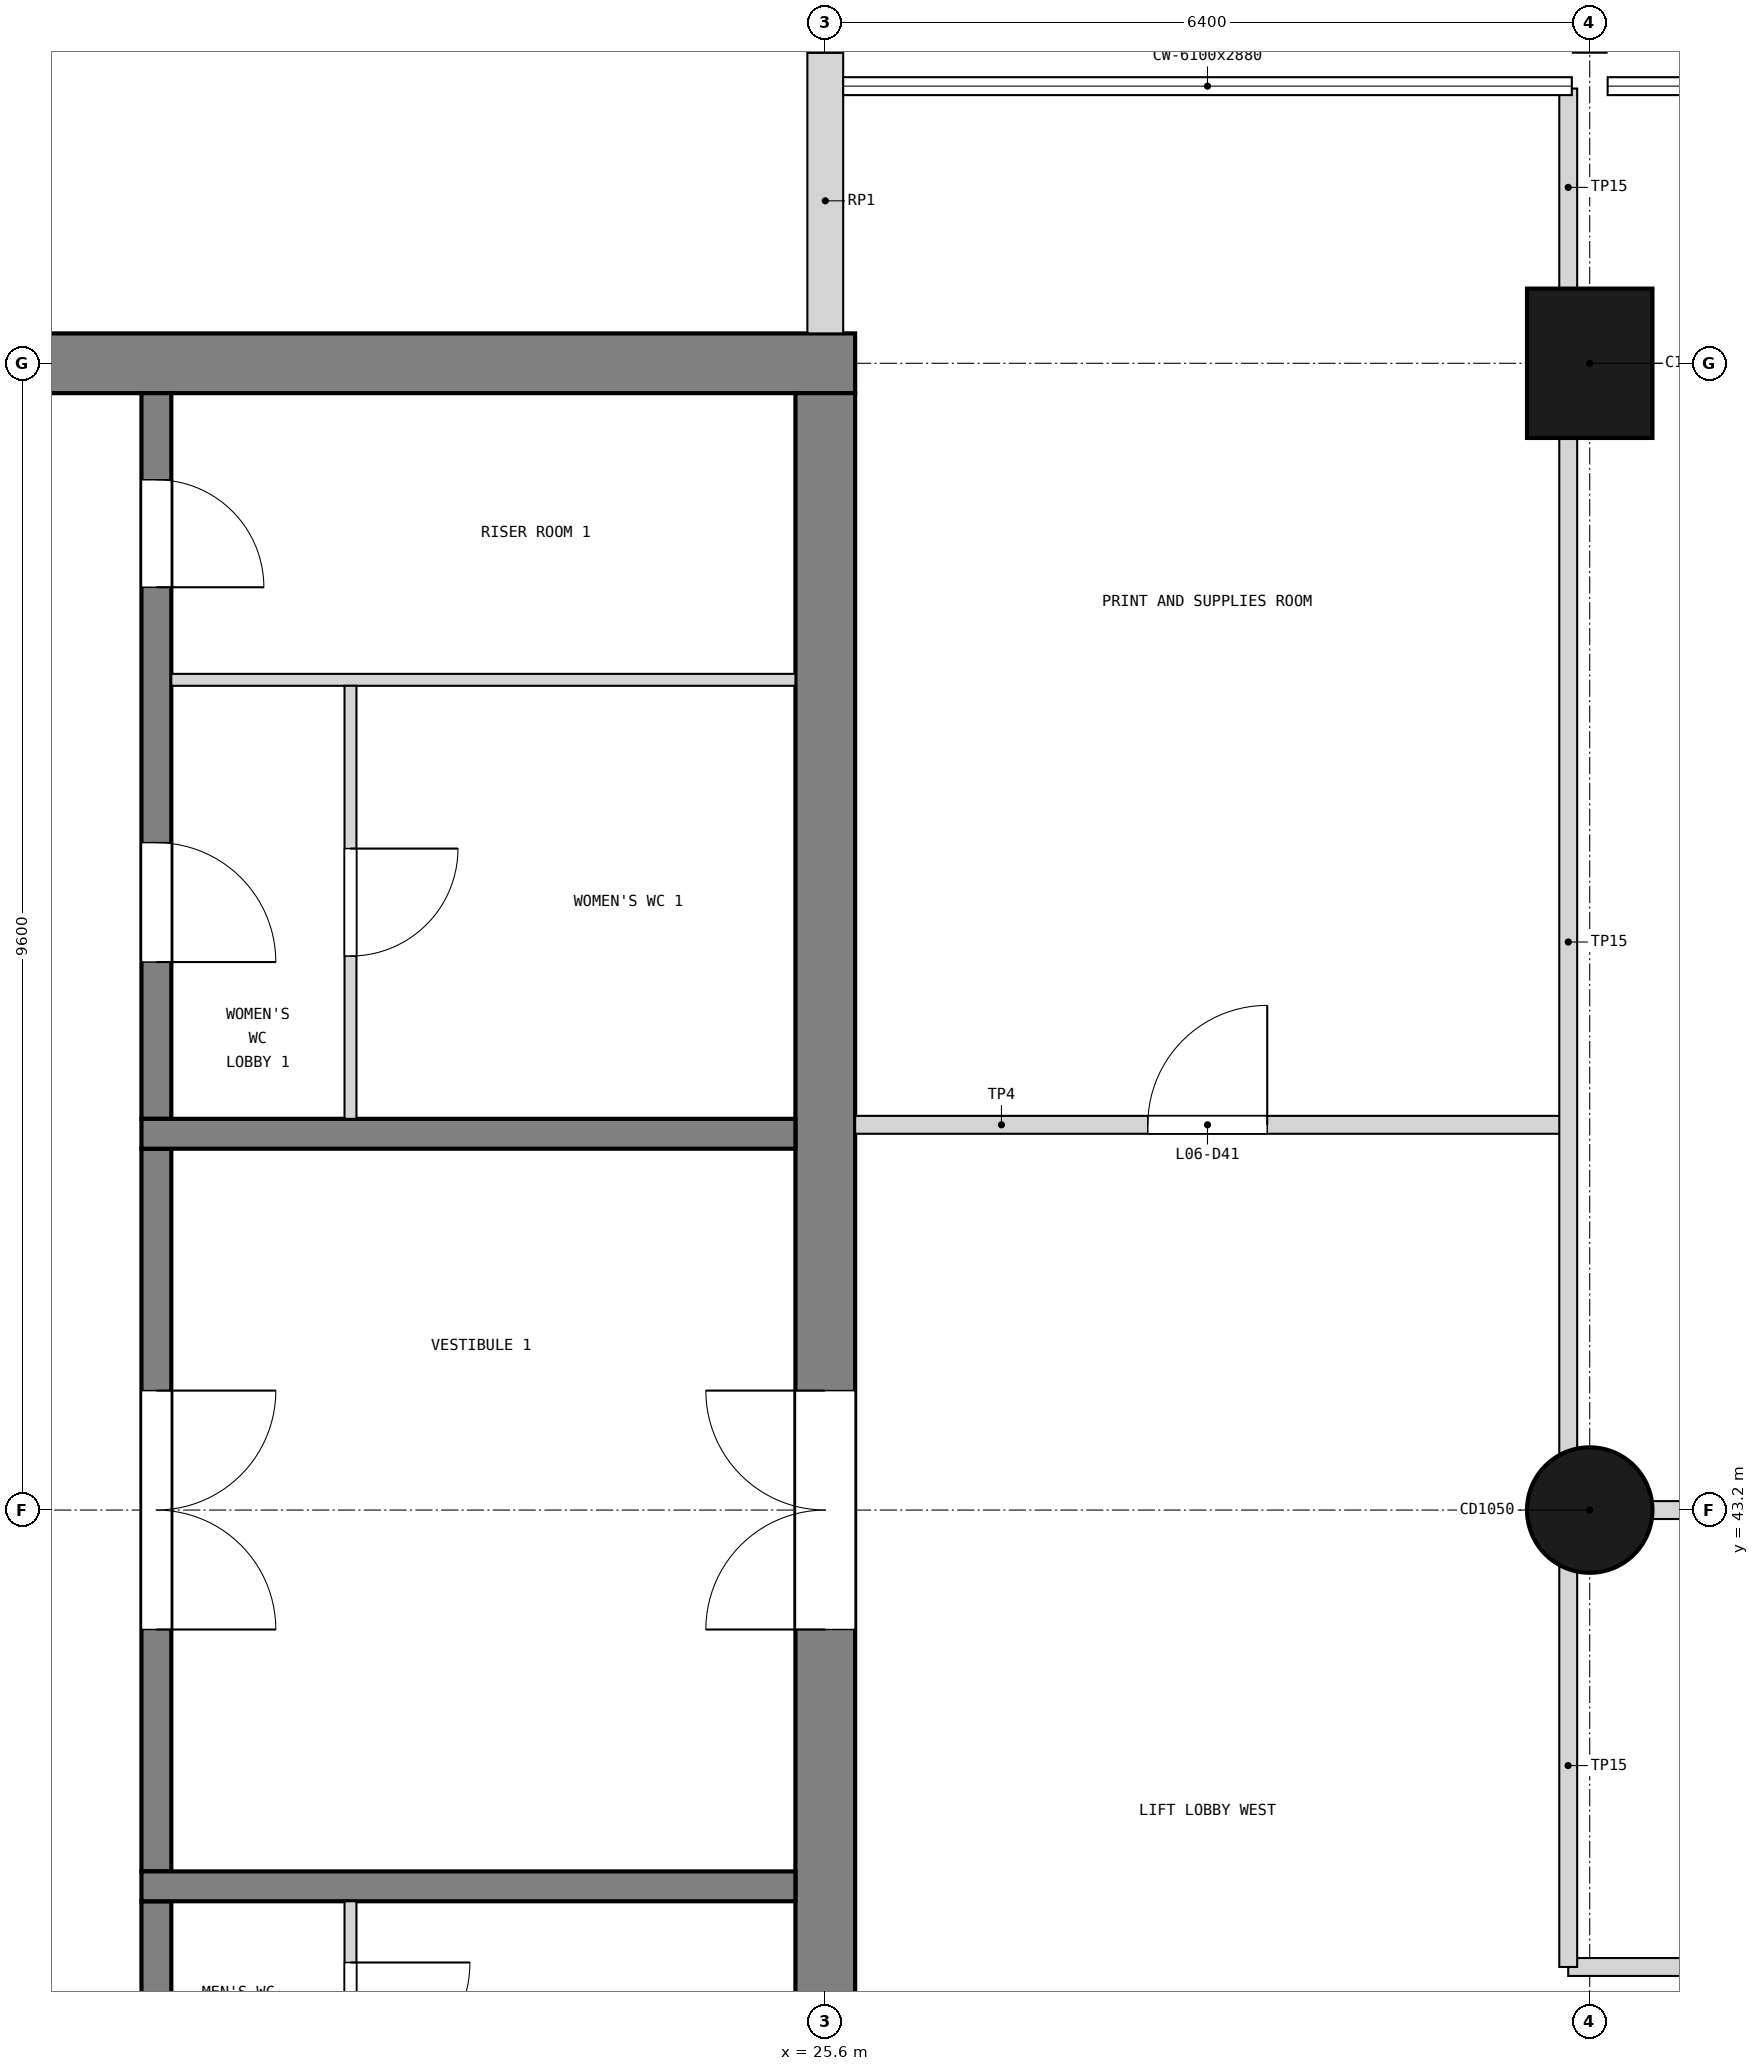
"""IFC4 building model, lengths in metres.
Left out: names, types, materials, properties, quantities, classifications, styles, units other than length and angle.
Written with IfcOpenShell. Run it as: python <this file> out.ifc"""

import sys

from ifc_helpers import new_model, si_unit, direction, frame, frame_2d, origin, origin_2d, place, context, subcontext, project, spatial, rectangle, circle, extrude, element, fill, save


model = new_model("IFC4")
c1 = context("Model", 3, precision=1e-05, world=origin(), true_north=direction((0.0, 1.0)))
c2 = subcontext(c1, "Body", "Model", "MODEL_VIEW")
j1 = project(units=[si_unit("LENGTHUNIT", "METRE"), si_unit("PLANEANGLEUNIT", "RADIAN")], contexts=[c1])
p1 = place(None, origin())
s1 = spatial("IfcSite", under=j1, at=p1, CompositionType="ELEMENT")
p2 = place(p1, origin())
s2 = spatial("IfcBuilding", under=s1, at=p2, CompositionType="ELEMENT")
p3 = place(p2, frame((0.0, 0.0, 24.9)))
s3 = spatial("IfcBuildingStorey", under=s2, at=p3, CompositionType="ELEMENT", Elevation=24.9)
p4 = place(p3, frame((12.55, 52.8, 0.0), z_axis=(0.0, 0.0, 1.0), x_axis=(1.0, 0.0, 0.0)))
e1 = element("IfcWall", 1, at=p4, inside=s3, PredefinedType="SHEAR", context=c2, shape_type="SweptSolid", body=[
    extrude(rectangle(XDim=13.3, YDim=0.5, at=frame_2d((6.65, 0.0))), origin(), (0.0, 0.0, 1.0), 3.9),
])
p5 = place(p4, frame((1.85, 0.0, 1.0)))
e2 = element("IfcOpeningElement", 2, at=p5, cuts=e1, PredefinedType="OPENING", context=c2, shape_type="SweptSolid", body=[
    extrude(rectangle(XDim=0.4, YDim=2.0, at=frame_2d((0.2, 1.0))), frame((0.0, 0.26, 0.0), z_axis=(0.0, -1.0, 0.0), x_axis=(1.0, 0.0, 0.0)), (0.0, 0.0, 1.0), 0.52),
])
p6 = place(p3, frame((25.6, 33.85, 0.0), z_axis=(0.0, 0.0, 1.0), x_axis=(0.0, 1.0, 0.0)))
e3 = element("IfcWall", 3, at=p6, inside=s3, PredefinedType="SHEAR", context=c2, shape_type="SweptSolid", body=[
    extrude(rectangle(XDim=18.7, YDim=0.5, at=frame_2d((9.35, 0.0))), origin(), (0.0, 0.0, 1.0), 3.9),
])
p7 = place(p6, frame((8.35, 0.0, 0.0)))
e4 = element("IfcOpeningElement", 4, at=p7, cuts=e3, PredefinedType="OPENING", context=c2, shape_type="SweptSolid", body=[
    extrude(rectangle(XDim=2.0, YDim=2.1, at=frame_2d((1.0, 1.05))), frame((0.0, 0.26, 0.0), z_axis=(0.0, -1.0, 0.0), x_axis=(1.0, 0.0, 0.0)), (0.0, 0.0, 1.0), 0.52),
])
p8 = place(p3, frame((32.0, 43.2, 0.0), z_axis=(0.0, 0.0, 1.0), x_axis=(1.0, 0.0, 0.0)))
e5 = element("IfcColumn", 5, at=p8, inside=s3, PredefinedType="COLUMN", context=c2, shape_type="SweptSolid", body=[
    extrude(circle(Radius=0.525, at=origin_2d()), origin(), (0.0, 0.0, 1.0), 3.9),
])
p9 = place(p3, frame((32.0, 52.8, 0.0), z_axis=(0.0, 0.0, 1.0), x_axis=(1.0, 0.0, 0.0)))
e6 = element("IfcColumn", 6, at=p9, inside=s3, PredefinedType="COLUMN", context=c2, shape_type="SweptSolid", body=[
    extrude(rectangle(XDim=1.05, YDim=1.25, at=origin_2d()), origin(), (0.0, 0.0, 1.0), 3.9),
])
p10 = place(p3, frame((25.6, 53.05, 0.0), z_axis=(0.0, 0.0, 1.0), x_axis=(0.0, 1.0, 0.0)))
e7 = element("IfcWall", 7, at=p10, inside=s3, PredefinedType="SOLIDWALL", context=c2, shape_type="SweptSolid", body=[
    extrude(rectangle(XDim=2.35, YDim=0.3, at=frame_2d((1.175, 0.0))), origin(), (0.0, 0.0, 1.0), 2.88),
])
p11 = place(p3, frame((20.0, 33.85, 0.0), z_axis=(0.0, 0.0, 1.0), x_axis=(0.0, 1.0, 0.0)))
e8 = element("IfcWall", 8, at=p11, inside=s3, PredefinedType="SOLIDWALL", context=c2, shape_type="SweptSolid", body=[
    extrude(rectangle(XDim=6.075, YDim=0.25, at=frame_2d((3.038, 0.0))), origin(), (0.0, 0.0, 1.0), 3.6),
])
p12 = place(p11, frame((0.425, 0.0, 0.0)))
e9 = element("IfcOpeningElement", 9, at=p12, cuts=e8, PredefinedType="OPENING", context=c2, shape_type="SweptSolid", body=[
    extrude(rectangle(XDim=0.8, YDim=2.1, at=frame_2d((0.4, 1.05))), frame((0.0, 0.135, 0.0), z_axis=(0.0, -1.0, 0.0), x_axis=(1.0, 0.0, 0.0)), (0.0, 0.0, 1.0), 0.27),
])
p13 = place(p11, frame((3.413, 0.0, 0.0)))
e10 = element("IfcOpeningElement", 10, at=p13, cuts=e8, PredefinedType="OPENING", context=c2, shape_type="SweptSolid", body=[
    extrude(rectangle(XDim=1.0, YDim=2.1, at=frame_2d((0.5, 1.05))), frame((0.0, 0.135, 0.0), z_axis=(0.0, -1.0, 0.0), x_axis=(1.0, 0.0, 0.0)), (0.0, 0.0, 1.0), 0.27),
])
p14 = place(p3, frame((20.0, 40.175, 0.0), z_axis=(0.0, 0.0, 1.0), x_axis=(0.0, 1.0, 0.0)))
e11 = element("IfcWall", 11, at=p14, inside=s3, PredefinedType="SOLIDWALL", context=c2, shape_type="SweptSolid", body=[
    extrude(rectangle(XDim=6.05, YDim=0.25, at=frame_2d((3.025, 0.0))), origin(), (0.0, 0.0, 1.0), 3.6),
])
p15 = place(p14, frame((2.025, 0.0, 0.0)))
e12 = element("IfcOpeningElement", 12, at=p15, cuts=e11, PredefinedType="OPENING", context=c2, shape_type="SweptSolid", body=[
    extrude(rectangle(XDim=2.0, YDim=2.1, at=frame_2d((1.0, 1.05))), frame((0.0, 0.135, 0.0), z_axis=(0.0, -1.0, 0.0), x_axis=(1.0, 0.0, 0.0)), (0.0, 0.0, 1.0), 0.27),
])
p16 = place(p3, frame((20.0, 46.475, 0.0), z_axis=(0.0, 0.0, 1.0), x_axis=(0.0, 1.0, 0.0)))
e13 = element("IfcWall", 13, at=p16, inside=s3, PredefinedType="SOLIDWALL", context=c2, shape_type="SweptSolid", body=[
    extrude(rectangle(XDim=6.075, YDim=0.25, at=frame_2d((3.038, 0.0))), origin(), (0.0, 0.0, 1.0), 3.6),
])
p17 = place(p16, frame((1.312, 0.0, 0.0)))
e14 = element("IfcOpeningElement", 14, at=p17, cuts=e13, PredefinedType="OPENING", context=c2, shape_type="SweptSolid", body=[
    extrude(rectangle(XDim=1.0, YDim=2.1, at=frame_2d((0.5, 1.05))), frame((0.0, 0.135, 0.0), z_axis=(0.0, -1.0, 0.0), x_axis=(1.0, 0.0, 0.0)), (0.0, 0.0, 1.0), 0.27),
])
p18 = place(p16, frame((4.45, 0.0, 0.0)))
e15 = element("IfcOpeningElement", 15, at=p18, cuts=e13, PredefinedType="OPENING", context=c2, shape_type="SweptSolid", body=[
    extrude(rectangle(XDim=0.9, YDim=2.1, at=frame_2d((0.45, 1.05))), frame((0.0, 0.135, 0.0), z_axis=(0.0, -1.0, 0.0), x_axis=(1.0, 0.0, 0.0)), (0.0, 0.0, 1.0), 0.27),
])
for number, where, z_axis, x_axis in (
    (16, (19.875, 40.05, 0.0), (0.0, 0.0, 1.0), (1.0, 0.0, 0.0)),
    (17, (19.875, 46.35, 0.0), (0.0, 0.0, 1.0), (1.0, 0.0, 0.0)),
):
    element("IfcWall", number, at=place(p3, frame(where, z_axis=z_axis, x_axis=x_axis)), inside=s3, PredefinedType="SOLIDWALL", context=c2, shape_type="SweptSolid", body=[
        extrude(rectangle(XDim=5.475, YDim=0.25, at=frame_2d((2.738, 0.0))), origin(), (0.0, 0.0, 1.0), 3.6),
    ])
p19 = place(p3, frame((21.625, 35.6, 0.0), z_axis=(0.0, 0.0, 1.0), x_axis=(0.0, 1.0, 0.0)))
e18 = element("IfcWall", 18, at=p19, inside=s3, PredefinedType="PARTITIONING", context=c2, shape_type="SweptSolid", body=[
    extrude(rectangle(XDim=4.325, YDim=0.1, at=frame_2d((2.163, 0.0))), origin(), (0.0, 0.0, 1.0), 3.6),
])
p20 = place(p19, frame((0.45, 0.0, 0.0)))
e19 = element("IfcOpeningElement", 19, at=p20, cuts=e18, PredefinedType="OPENING", context=c2, shape_type="SweptSolid", body=[
    extrude(rectangle(XDim=0.9, YDim=2.1, at=frame_2d((0.45, 1.05))), frame((0.0, 0.06, 0.0), z_axis=(0.0, -1.0, 0.0), x_axis=(1.0, 0.0, 0.0)), (0.0, 0.0, 1.0), 0.12),
])
p21 = place(p19, frame((2.812, 0.0, 0.0)))
e20 = element("IfcOpeningElement", 20, at=p21, cuts=e18, PredefinedType="OPENING", context=c2, shape_type="SweptSolid", body=[
    extrude(rectangle(XDim=1.0, YDim=2.1, at=frame_2d((0.5, 1.05))), frame((0.0, 0.06, 0.0), z_axis=(0.0, -1.0, 0.0), x_axis=(1.0, 0.0, 0.0)), (0.0, 0.0, 1.0), 0.12),
])
p22 = place(p3, frame((20.125, 50.15, 0.0), z_axis=(0.0, 0.0, 1.0), x_axis=(1.0, 0.0, 0.0)))
e21 = element("IfcWall", 21, at=p22, inside=s3, PredefinedType="PARTITIONING", context=c2, shape_type="SweptSolid", body=[
    extrude(rectangle(XDim=5.225, YDim=0.1, at=frame_2d((2.613, 0.0))), origin(), (0.0, 0.0, 1.0), 3.6),
])
p23 = place(p3, frame((21.625, 46.475, 0.0), z_axis=(0.0, 0.0, 1.0), x_axis=(0.0, 1.0, 0.0)))
e22 = element("IfcWall", 22, at=p23, inside=s3, PredefinedType="PARTITIONING", context=c2, shape_type="SweptSolid", body=[
    extrude(rectangle(XDim=3.625, YDim=0.1, at=frame_2d((1.812, 0.0))), origin(), (0.0, 0.0, 1.0), 3.6),
])
p24 = place(p23, frame((1.363, 0.0, 0.0)))
e23 = element("IfcOpeningElement", 23, at=p24, cuts=e22, PredefinedType="OPENING", context=c2, shape_type="SweptSolid", body=[
    extrude(rectangle(XDim=0.9, YDim=2.1, at=frame_2d((0.45, 1.05))), frame((0.0, 0.06, 0.0), z_axis=(0.0, -1.0, 0.0), x_axis=(1.0, 0.0, 0.0)), (0.0, 0.0, 1.0), 0.12),
])
p25 = place(p3, frame((31.82, 39.375, 0.0), z_axis=(0.0, 0.0, 1.0), x_axis=(1.0, 0.0, 0.0)))
e24 = element("IfcWall", 24, at=p25, inside=s3, PredefinedType="PARTITIONING", context=c2, shape_type="SweptSolid", body=[
    extrude(rectangle(XDim=6.4, YDim=0.15, at=frame_2d((3.2, 0.0))), origin(), (0.0, 0.0, 1.0), 3.68),
])
p26 = place(p25, frame((2.73, 0.0, 0.0)))
e25 = element("IfcOpeningElement", 25, at=p26, cuts=e24, PredefinedType="OPENING", context=c2, shape_type="SweptSolid", body=[
    extrude(rectangle(XDim=1.0, YDim=2.1, at=frame_2d((0.5, 1.05))), frame((0.0, 0.085, 0.0), z_axis=(0.0, -1.0, 0.0), x_axis=(1.0, 0.0, 0.0)), (0.0, 0.0, 1.0), 0.17),
])
p27 = place(p3, frame((31.82, 43.2, 0.0), z_axis=(0.0, 0.0, 1.0), x_axis=(1.0, 0.0, 0.0)))
e26 = element("IfcWall", 26, at=p27, inside=s3, PredefinedType="PARTITIONING", context=c2, shape_type="SweptSolid", body=[
    extrude(rectangle(XDim=25.96, YDim=0.15, at=frame_2d((12.98, 0.0))), origin(), (0.0, 0.0, 1.0), 2.88),
])
p28 = place(p27, frame((13.825, 0.0, 0.0)))
e27 = element("IfcOpeningElement", 27, at=p28, cuts=e26, PredefinedType="OPENING", context=c2, shape_type="SweptSolid", body=[
    extrude(rectangle(XDim=1.8, YDim=2.1, at=frame_2d((0.9, 1.05))), frame((0.0, 0.085, 0.0), z_axis=(0.0, -1.0, 0.0), x_axis=(1.0, 0.0, 0.0)), (0.0, 0.0, 1.0), 0.17),
])
p29 = place(p27, frame((16.725, 0.0, 0.0)))
e28 = element("IfcOpeningElement", 28, at=p29, cuts=e26, PredefinedType="OPENING", context=c2, shape_type="SweptSolid", body=[
    extrude(rectangle(XDim=1.8, YDim=2.1, at=frame_2d((0.9, 1.05))), frame((0.0, 0.085, 0.0), z_axis=(0.0, -1.0, 0.0), x_axis=(1.0, 0.0, 0.0)), (0.0, 0.0, 1.0), 0.17),
])
p30 = place(p3, frame((25.85, 46.425, 0.0), z_axis=(0.0, 0.0, 1.0), x_axis=(1.0, 0.0, 0.0)))
e29 = element("IfcWall", 29, at=p30, inside=s3, PredefinedType="PARTITIONING", context=c2, shape_type="SweptSolid", body=[
    extrude(rectangle(XDim=5.97, YDim=0.15, at=frame_2d((2.985, 0.0))), origin(), (0.0, 0.0, 1.0), 3.68),
])
p31 = place(p30, frame((2.45, 0.0, 0.0)))
e30 = element("IfcOpeningElement", 30, at=p31, cuts=e29, PredefinedType="OPENING", context=c2, shape_type="SweptSolid", body=[
    extrude(rectangle(XDim=1.0, YDim=2.1, at=frame_2d((0.5, 1.05))), frame((0.0, 0.085, 0.0), z_axis=(0.0, -1.0, 0.0), x_axis=(1.0, 0.0, 0.0)), (0.0, 0.0, 1.0), 0.17),
])
p32 = place(p3, frame((31.82, 39.375, 0.0), z_axis=(0.0, 0.0, 1.0), x_axis=(0.0, 1.0, 0.0)))
e31 = element("IfcWall", 31, at=p32, inside=s3, PredefinedType="PARTITIONING", context=c2, shape_type="SweptSolid", body=[
    extrude(rectangle(XDim=3.352, YDim=0.15, at=frame_2d((1.676, 0.0))), origin(), (0.0, 0.0, 1.0), 2.78),
])
p33 = place(p3, frame((31.82, 43.673, 0.0), z_axis=(0.0, 0.0, 1.0), x_axis=(0.0, 1.0, 0.0)))
e32 = element("IfcWall", 32, at=p33, inside=s3, PredefinedType="PARTITIONING", context=c2, shape_type="SweptSolid", body=[
    extrude(rectangle(XDim=8.522, YDim=0.15, at=frame_2d((4.261, 0.0))), origin(), (0.0, 0.0, 1.0), 2.78),
])
p34 = place(p3, frame((31.82, 53.405, 0.0), z_axis=(0.0, 0.0, 1.0), x_axis=(0.0, 1.0, 0.0)))
e33 = element("IfcWall", 33, at=p34, inside=s3, PredefinedType="PARTITIONING", context=c2, shape_type="SweptSolid", body=[
    extrude(rectangle(XDim=1.695, YDim=0.15, at=frame_2d((0.848, 0.0))), origin(), (0.0, 0.0, 1.0), 2.78),
])
p35 = place(p15, frame((2.0, 0.0, 0.0), z_axis=(0.0, 0.0, 1.0), x_axis=(-1.0, 0.0, 0.0)))
e34 = element("IfcDoor", 34, at=p35, inside=s3, OperationType="DOUBLE_DOOR_SINGLE_SWING", PredefinedType="DOOR", context=c2, shape_type="SweptSolid", body=[
    extrude(rectangle(XDim=2.0, YDim=2.1, at=frame_2d((1.0, 1.05))), frame((0.0, 0.025, 0.0), z_axis=(0.0, -1.0, 0.0), x_axis=(1.0, 0.0, 0.0)), (0.0, 0.0, 1.0), 0.05),
])
fill(e12, e34)
p36 = place(p7, origin())
e35 = element("IfcDoor", 35, at=p36, inside=s3, OperationType="DOUBLE_DOOR_SINGLE_SWING", PredefinedType="DOOR", context=c2, shape_type="SweptSolid", body=[
    extrude(rectangle(XDim=2.0, YDim=2.1, at=frame_2d((1.0, 1.05))), frame((0.0, 0.025, 0.0), z_axis=(0.0, -1.0, 0.0), x_axis=(1.0, 0.0, 0.0)), (0.0, 0.0, 1.0), 0.05),
])
fill(e4, e35)
p37 = place(p21, frame((1.0, 0.0, 0.0), z_axis=(0.0, 0.0, 1.0), x_axis=(-1.0, 0.0, 0.0)))
e36 = element("IfcDoor", 36, at=p37, inside=s3, OperationType="SINGLE_SWING_LEFT", PredefinedType="DOOR", context=c2, shape_type="SweptSolid", body=[
    extrude(rectangle(XDim=1.0, YDim=2.1, at=frame_2d((0.5, 1.05))), frame((0.0, 0.025, 0.0), z_axis=(0.0, -1.0, 0.0), x_axis=(1.0, 0.0, 0.0)), (0.0, 0.0, 1.0), 0.05),
])
fill(e20, e36)
p38 = place(p17, frame((1.0, 0.0, 0.0), z_axis=(0.0, 0.0, 1.0), x_axis=(-1.0, 0.0, 0.0)))
e37 = element("IfcDoor", 37, at=p38, inside=s3, OperationType="SINGLE_SWING_RIGHT", PredefinedType="DOOR", context=c2, shape_type="SweptSolid", body=[
    extrude(rectangle(XDim=1.0, YDim=2.1, at=frame_2d((0.5, 1.05))), frame((0.0, 0.025, 0.0), z_axis=(0.0, -1.0, 0.0), x_axis=(1.0, 0.0, 0.0)), (0.0, 0.0, 1.0), 0.05),
])
fill(e14, e37)
p39 = place(p24, frame((0.9, 0.0, 0.0), z_axis=(0.0, 0.0, 1.0), x_axis=(-1.0, 0.0, 0.0)))
e38 = element("IfcDoor", 38, at=p39, inside=s3, OperationType="SINGLE_SWING_LEFT", PredefinedType="DOOR", context=c2, shape_type="SweptSolid", body=[
    extrude(rectangle(XDim=0.9, YDim=2.1, at=frame_2d((0.45, 1.05))), frame((0.0, 0.025, 0.0), z_axis=(0.0, -1.0, 0.0), x_axis=(1.0, 0.0, 0.0)), (0.0, 0.0, 1.0), 0.05),
])
fill(e23, e38)
p40 = place(p18, frame((0.9, 0.0, 0.0), z_axis=(0.0, 0.0, 1.0), x_axis=(-1.0, 0.0, 0.0)))
e39 = element("IfcDoor", 39, at=p40, inside=s3, OperationType="SINGLE_SWING_RIGHT", PredefinedType="DOOR", context=c2, shape_type="SweptSolid", body=[
    extrude(rectangle(XDim=0.9, YDim=2.1, at=frame_2d((0.45, 1.05))), frame((0.0, 0.025, 0.0), z_axis=(0.0, -1.0, 0.0), x_axis=(1.0, 0.0, 0.0)), (0.0, 0.0, 1.0), 0.05),
])
fill(e15, e39)
p41 = place(p31, origin())
e40 = element("IfcDoor", 40, at=p41, inside=s3, OperationType="SINGLE_SWING_RIGHT", PredefinedType="DOOR", context=c2, shape_type="SweptSolid", body=[
    extrude(rectangle(XDim=1.0, YDim=2.1, at=frame_2d((0.5, 1.05))), frame((0.0, 0.025, 0.0), z_axis=(0.0, -1.0, 0.0), x_axis=(1.0, 0.0, 0.0)), (0.0, 0.0, 1.0), 0.05),
])
fill(e30, e40)
save(model, sys.argv[1])
